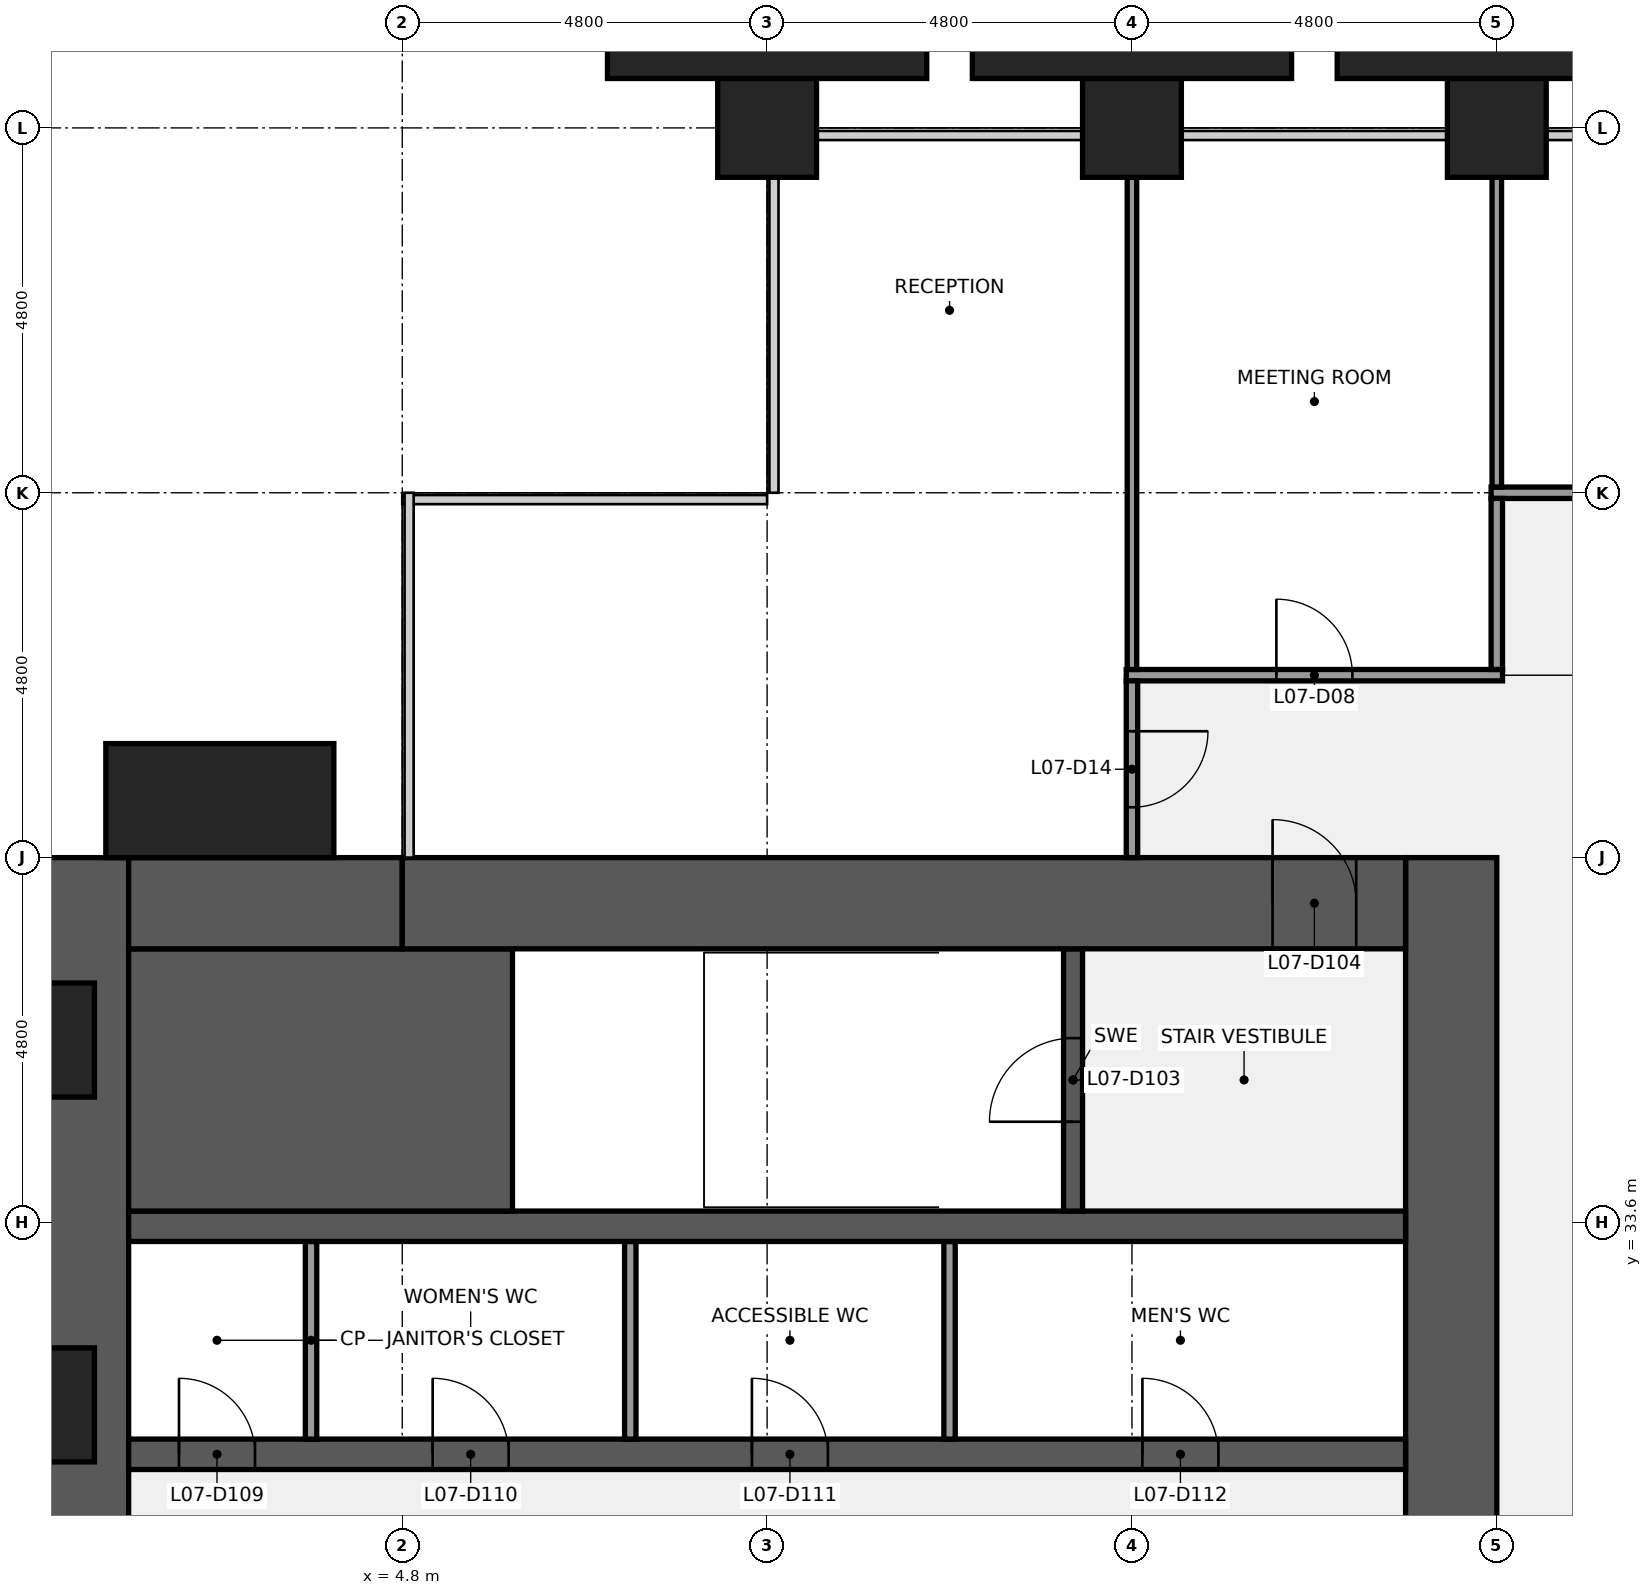
"""IFC4 building model, lengths in metres.
Left out: names, types, materials, properties, quantities, classifications, styles, units other than length and angle.
Written with IfcOpenShell. Run it as: python <this file> out.ifc"""

import sys

from ifc_helpers import new_model, si_unit, direction, frame, frame_2d, origin, origin_2d, place, context, subcontext, project, spatial, rectangle, extrude, element, fill, save


model = new_model("IFC4")
c1 = context("Model", 3, precision=1e-05, world=origin(), true_north=direction((0.0, 1.0)))
c2 = subcontext(c1, "Body", "Model", "MODEL_VIEW")
j1 = project(units=[si_unit("LENGTHUNIT", "METRE"), si_unit("PLANEANGLEUNIT", "RADIAN")], contexts=[c1])
p1 = place(None, origin())
s1 = spatial("IfcSite", under=j1, at=p1, CompositionType="ELEMENT")
p2 = place(p1, origin())
s2 = spatial("IfcBuilding", under=s1, at=p2, CompositionType="ELEMENT")
p3 = place(p2, frame((0.0, 0.0, 39.0)))
s3 = spatial("IfcBuildingStorey", under=s2, at=p3, CompositionType="ELEMENT", Elevation=39.0)
for number, where, z_axis, x_axis in (
    (1, (9.6, 48.0, 0.0), (0.0, 0.0, 1.0), (1.0, 0.0, 0.0)),
    (2, (14.4, 48.0, 0.0), (0.0, 0.0, 1.0), (1.0, 0.0, 0.0)),
    (3, (19.2, 48.0, 0.0), (0.0, 0.0, 1.0), (1.0, 0.0, 0.0)),
):
    element("IfcColumn", number, at=place(p3, frame(where, z_axis=z_axis, x_axis=x_axis)), inside=s3, PredefinedType="COLUMN", context=c2, shape_type="SweptSolid", body=[
        extrude(rectangle(XDim=1.3, YDim=1.3, at=origin_2d()), origin(), (0.0, 0.0, 1.0), 4.0),
    ])
p4 = place(p3, frame((0.6, 9.6, 0.0), z_axis=(0.0, 0.0, 1.0), x_axis=(0.0, 1.0, 0.0)))
e4 = element("IfcWall", 4, at=p4, inside=s3, PredefinedType="SHEAR", context=c2, shape_type="SweptSolid", body=[
    extrude(rectangle(XDim=28.8, YDim=1.2, at=frame_2d((14.4, 0.0))), origin(), (0.0, 0.0, 1.0), 3.84),
])
p5 = place(p4, frame((8.85, 0.0, 0.9)))
e5 = element("IfcOpeningElement", 5, at=p5, cuts=e4, PredefinedType="OPENING", context=c2, shape_type="SweptSolid", body=[
    extrude(rectangle(XDim=1.5, YDim=1.5, at=frame_2d((0.75, 0.75))), frame((0.0, 0.61, 0.0), z_axis=(0.0, -1.0, 0.0), x_axis=(1.0, 0.0, 0.0)), (0.0, 0.0, 1.0), 1.22),
])
p6 = place(p4, frame((18.45, 0.0, 0.9)))
e6 = element("IfcOpeningElement", 6, at=p6, cuts=e4, PredefinedType="OPENING", context=c2, shape_type="SweptSolid", body=[
    extrude(rectangle(XDim=1.5, YDim=1.5, at=frame_2d((0.75, 0.75))), frame((0.0, 0.61, 0.0), z_axis=(0.0, -1.0, 0.0), x_axis=(1.0, 0.0, 0.0)), (0.0, 0.0, 1.0), 1.22),
])
p7 = place(p3, frame((18.6, 38.4, 0.0), z_axis=(0.0, 0.0, 1.0), x_axis=(0.0, -1.0, 0.0)))
e7 = element("IfcWall", 7, at=p7, inside=s3, PredefinedType="SHEAR", context=c2, shape_type="SweptSolid", body=[
    extrude(rectangle(XDim=28.8, YDim=1.2, at=frame_2d((14.4, 0.0))), origin(), (0.0, 0.0, 1.0), 3.84),
])
p8 = place(p7, frame((18.3, 0.0, 0.0)))
e8 = element("IfcOpeningElement", 8, at=p8, cuts=e7, PredefinedType="OPENING", context=c2, shape_type="SweptSolid", body=[
    extrude(rectangle(XDim=1.8, YDim=2.1, at=frame_2d((0.9, 1.05))), frame((0.0, 0.61, 0.0), z_axis=(0.0, -1.0, 0.0), x_axis=(1.0, 0.0, 0.0)), (0.0, 0.0, 1.0), 1.22),
])
p9 = place(p7, frame((8.7, 0.0, 0.0)))
e9 = element("IfcOpeningElement", 9, at=p9, cuts=e7, PredefinedType="OPENING", context=c2, shape_type="SweptSolid", body=[
    extrude(rectangle(XDim=1.8, YDim=2.1, at=frame_2d((0.9, 1.05))), frame((0.0, 0.61, 0.0), z_axis=(0.0, -1.0, 0.0), x_axis=(1.0, 0.0, 0.0)), (0.0, 0.0, 1.0), 1.22),
])
p10 = place(p3, frame((1.2, 30.55, 0.0), z_axis=(0.0, 0.0, 1.0), x_axis=(1.0, 0.0, 0.0)))
e10 = element("IfcWall", 10, at=p10, inside=s3, PredefinedType="SHEAR", context=c2, shape_type="SweptSolid", body=[
    extrude(rectangle(XDim=16.8, YDim=0.4, at=frame_2d((8.4, 0.0))), origin(), (0.0, 0.0, 1.0), 3.84),
])
p11 = place(p10, frame((0.663, 0.0, 0.0)))
e11 = element("IfcOpeningElement", 11, at=p11, cuts=e10, PredefinedType="OPENING", context=c2, shape_type="SweptSolid", body=[
    extrude(rectangle(XDim=1.0, YDim=2.1, at=frame_2d((0.5, 1.05))), frame((0.0, 0.21, 0.0), z_axis=(0.0, -1.0, 0.0), x_axis=(1.0, 0.0, 0.0)), (0.0, 0.0, 1.0), 0.42),
])
p12 = place(p10, frame((4.0, 0.0, 0.0)))
e12 = element("IfcOpeningElement", 12, at=p12, cuts=e10, PredefinedType="OPENING", context=c2, shape_type="SweptSolid", body=[
    extrude(rectangle(XDim=1.0, YDim=2.1, at=frame_2d((0.5, 1.05))), frame((0.0, 0.21, 0.0), z_axis=(0.0, -1.0, 0.0), x_axis=(1.0, 0.0, 0.0)), (0.0, 0.0, 1.0), 0.42),
])
p13 = place(p10, frame((8.2, 0.0, 0.0)))
e13 = element("IfcOpeningElement", 13, at=p13, cuts=e10, PredefinedType="OPENING", context=c2, shape_type="SweptSolid", body=[
    extrude(rectangle(XDim=1.0, YDim=2.1, at=frame_2d((0.5, 1.05))), frame((0.0, 0.21, 0.0), z_axis=(0.0, -1.0, 0.0), x_axis=(1.0, 0.0, 0.0)), (0.0, 0.0, 1.0), 0.42),
])
p14 = place(p10, frame((13.337, 0.0, 0.0)))
e14 = element("IfcOpeningElement", 14, at=p14, cuts=e10, PredefinedType="OPENING", context=c2, shape_type="SweptSolid", body=[
    extrude(rectangle(XDim=1.0, YDim=2.1, at=frame_2d((0.5, 1.05))), frame((0.0, 0.21, 0.0), z_axis=(0.0, -1.0, 0.0), x_axis=(1.0, 0.0, 0.0)), (0.0, 0.0, 1.0), 0.42),
])
for number, where, z_axis, x_axis in (
    (15, (3.6, 30.75, 0.0), (0.0, 0.0, 1.0), (0.0, 1.0, 0.0)),
    (16, (7.8, 30.75, 0.0), (0.0, 0.0, 1.0), (0.0, 1.0, 0.0)),
    (17, (12.0, 30.75, 0.0), (0.0, 0.0, 1.0), (0.0, 1.0, 0.0)),
):
    element("IfcWall", number, at=place(p3, frame(where, z_axis=z_axis, x_axis=x_axis)), inside=s3, PredefinedType="PARTITIONING", context=c2, shape_type="SweptSolid", body=[
        extrude(rectangle(XDim=2.6, YDim=0.15, at=frame_2d((1.3, 0.0))), origin(), (0.0, 0.0, 1.0), 3.84),
    ])
p15 = place(p3, frame((1.2, 33.55, 0.0), z_axis=(0.0, 0.0, 1.0), x_axis=(1.0, 0.0, 0.0)))
e18 = element("IfcWall", 18, at=p15, inside=s3, PredefinedType="SHEAR", context=c2, shape_type="SweptSolid", body=[
    extrude(rectangle(XDim=16.8, YDim=0.4, at=frame_2d((8.4, 0.0))), origin(), (0.0, 0.0, 1.0), 3.84),
])
p16 = place(p3, frame((1.2, 35.475, 0.0), z_axis=(0.0, 0.0, 1.0), x_axis=(1.0, 0.0, 0.0)))
e19 = element("IfcWall", 19, at=p16, inside=s3, PredefinedType="SHEAR", context=c2, shape_type="SweptSolid", body=[
    extrude(rectangle(XDim=5.05, YDim=3.45, at=frame_2d((2.525, 0.0))), origin(), (0.0, 0.0, 1.0), 3.84),
])
p17 = place(p3, frame((13.625, 33.75, 0.0), z_axis=(0.0, 0.0, 1.0), x_axis=(0.0, 1.0, 0.0)))
e20 = element("IfcWall", 20, at=p17, inside=s3, PredefinedType="SHEAR", context=c2, shape_type="SweptSolid", body=[
    extrude(rectangle(XDim=3.45, YDim=0.25, at=frame_2d((1.725, 0.0))), origin(), (0.0, 0.0, 1.0), 3.84),
])
p18 = place(p17, frame((1.175, 0.0, 0.0)))
e21 = element("IfcOpeningElement", 21, at=p18, cuts=e20, PredefinedType="OPENING", context=c2, shape_type="SweptSolid", body=[
    extrude(rectangle(XDim=1.1, YDim=2.1, at=frame_2d((0.55, 1.05))), frame((0.0, 0.135, 0.0), z_axis=(0.0, -1.0, 0.0), x_axis=(1.0, 0.0, 0.0)), (0.0, 0.0, 1.0), 0.27),
])
p19 = place(p3, frame((1.2, 37.8, 0.0), z_axis=(0.0, 0.0, 1.0), x_axis=(1.0, 0.0, 0.0)))
e22 = element("IfcWall", 22, at=p19, inside=s3, PredefinedType="SHEAR", context=c2, shape_type="SweptSolid", body=[
    extrude(rectangle(XDim=3.6, YDim=1.2, at=frame_2d((1.8, 0.0))), origin(), (0.0, 0.0, 1.0), 3.84),
])
p20 = place(p3, frame((4.8, 37.8, 0.0), z_axis=(0.0, 0.0, 1.0), x_axis=(1.0, 0.0, 0.0)))
e23 = element("IfcWall", 23, at=p20, inside=s3, PredefinedType="SHEAR", context=c2, shape_type="SweptSolid", body=[
    extrude(rectangle(XDim=13.2, YDim=1.2, at=frame_2d((6.6, 0.0))), origin(), (0.0, 0.0, 1.0), 3.84),
])
p21 = place(p20, frame((11.45, 0.0, 0.0)))
e24 = element("IfcOpeningElement", 24, at=p21, cuts=e23, PredefinedType="OPENING", context=c2, shape_type="SweptSolid", body=[
    extrude(rectangle(XDim=1.1, YDim=2.1, at=frame_2d((0.55, 1.05))), frame((0.0, 0.61, 0.0), z_axis=(0.0, -1.0, 0.0), x_axis=(1.0, 0.0, 0.0)), (0.0, 0.0, 1.0), 1.22),
])
p22 = place(p3, frame((14.325, 40.8, 0.0), z_axis=(0.0, 0.0, 1.0), x_axis=(1.0, 0.0, 0.0)))
e25 = element("IfcWall", 25, at=p22, inside=s3, PredefinedType="PARTITIONING", context=c2, shape_type="SweptSolid", body=[
    extrude(rectangle(XDim=4.95, YDim=0.15, at=frame_2d((2.475, 0.0))), origin(), (0.0, 0.0, 1.0), 2.87),
])
p23 = place(p22, frame((1.975, 0.0, 0.0)))
e26 = element("IfcOpeningElement", 26, at=p23, cuts=e25, PredefinedType="OPENING", context=c2, shape_type="SweptSolid", body=[
    extrude(rectangle(XDim=1.0, YDim=2.1, at=frame_2d((0.5, 1.05))), frame((0.0, 0.085, 0.0), z_axis=(0.0, -1.0, 0.0), x_axis=(1.0, 0.0, 0.0)), (0.0, 0.0, 1.0), 0.17),
])
p24 = place(p3, frame((19.125, 43.2, 0.0), z_axis=(0.0, 0.0, 1.0), x_axis=(1.0, 0.0, 0.0)))
e27 = element("IfcWall", 27, at=p24, inside=s3, PredefinedType="PARTITIONING", context=c2, shape_type="SweptSolid", body=[
    extrude(rectangle(XDim=19.35, YDim=0.15, at=frame_2d((9.675, 0.0))), origin(), (0.0, 0.0, 1.0), 2.87),
])
p25 = place(p24, frame((9.175, 0.0, 0.0)))
e28 = element("IfcOpeningElement", 28, at=p25, cuts=e27, PredefinedType="OPENING", context=c2, shape_type="SweptSolid", body=[
    extrude(rectangle(XDim=1.0, YDim=2.1, at=frame_2d((0.5, 1.05))), frame((0.0, 0.085, 0.0), z_axis=(0.0, -1.0, 0.0), x_axis=(1.0, 0.0, 0.0)), (0.0, 0.0, 1.0), 0.17),
])
p26 = place(p3, frame((14.4, 40.875, 0.0), z_axis=(0.0, 0.0, 1.0), x_axis=(0.0, 1.0, 0.0)))
e29 = element("IfcWall", 29, at=p26, inside=s3, PredefinedType="PARTITIONING", context=c2, shape_type="SweptSolid", body=[
    extrude(rectangle(XDim=6.475, YDim=0.125, at=frame_2d((3.238, 0.0))), origin(), (0.0, 0.0, 1.0), 2.87),
])
p27 = place(p3, frame((14.4, 38.4, 0.0), z_axis=(0.0, 0.0, 1.0), x_axis=(0.0, 1.0, 0.0)))
e30 = element("IfcWall", 30, at=p27, inside=s3, PredefinedType="PARTITIONING", context=c2, shape_type="SweptSolid", body=[
    extrude(rectangle(XDim=2.325, YDim=0.15, at=frame_2d((1.163, 0.0))), origin(), (0.0, 0.0, 1.0), 2.87),
])
p28 = place(p27, frame((0.663, 0.0, 0.0)))
e31 = element("IfcOpeningElement", 31, at=p28, cuts=e30, PredefinedType="OPENING", context=c2, shape_type="SweptSolid", body=[
    extrude(rectangle(XDim=1.0, YDim=2.1, at=frame_2d((0.5, 1.05))), frame((0.0, 0.085, 0.0), z_axis=(0.0, -1.0, 0.0), x_axis=(1.0, 0.0, 0.0)), (0.0, 0.0, 1.0), 0.17),
])
p29 = place(p3, frame((19.2, 43.275, 0.0), z_axis=(0.0, 0.0, 1.0), x_axis=(0.0, 1.0, 0.0)))
e32 = element("IfcWall", 32, at=p29, inside=s3, PredefinedType="PARTITIONING", context=c2, shape_type="SweptSolid", body=[
    extrude(rectangle(XDim=4.075, YDim=0.125, at=frame_2d((2.038, 0.0))), origin(), (0.0, 0.0, 1.0), 2.87),
])
p30 = place(p3, frame((19.2, 40.875, 0.0), z_axis=(0.0, 0.0, 1.0), x_axis=(0.0, 1.0, 0.0)))
e33 = element("IfcWall", 33, at=p30, inside=s3, PredefinedType="PARTITIONING", context=c2, shape_type="SweptSolid", body=[
    extrude(rectangle(XDim=2.25, YDim=0.15, at=frame_2d((1.125, 0.0))), origin(), (0.0, 0.0, 1.0), 2.87),
])
p31 = place(p3, frame((2.4, 39.15, 0.0), z_axis=(0.0, 0.0, 1.0), x_axis=(1.0, 0.0, 0.0)))
e34 = element("IfcColumn", 34, at=p31, inside=s3, PredefinedType="PILASTER", context=c2, shape_type="SweptSolid", body=[
    extrude(rectangle(XDim=3.0, YDim=1.5, at=origin_2d()), origin(), (0.0, 0.0, 1.0), 4.0),
])
for number, where, z_axis, x_axis in (
    (35, (9.6, 49.075, 0.0), (0.0, 0.0, 1.0), (1.0, 0.0, 0.0)),
    (36, (14.4, 49.075, 0.0), (0.0, 0.0, 1.0), (1.0, 0.0, 0.0)),
    (37, (19.2, 49.075, 0.0), (0.0, 0.0, 1.0), (1.0, 0.0, 0.0)),
):
    element("IfcColumn", number, at=place(p3, frame(where, z_axis=z_axis, x_axis=x_axis)), inside=s3, PredefinedType="PILASTER", context=c2, shape_type="SweptSolid", body=[
        extrude(rectangle(XDim=4.2, YDim=0.85, at=origin_2d()), origin(), (0.0, 0.0, 1.0), 4.0),
    ])
p32 = place(p18, origin())
e38 = element("IfcDoor", 38, at=p32, inside=s3, OperationType="SINGLE_SWING_LEFT", PredefinedType="DOOR", context=c2, shape_type="SweptSolid", body=[
    extrude(rectangle(XDim=1.1, YDim=2.1, at=frame_2d((0.55, 1.05))), frame((0.0, 0.025, 0.0), z_axis=(0.0, -1.0, 0.0), x_axis=(1.0, 0.0, 0.0)), (0.0, 0.0, 1.0), 0.05),
])
fill(e21, e38)
p33 = place(p21, origin())
e39 = element("IfcDoor", 39, at=p33, inside=s3, OperationType="SINGLE_SWING_LEFT", PredefinedType="DOOR", context=c2, shape_type="SweptSolid", body=[
    extrude(rectangle(XDim=1.1, YDim=2.1, at=frame_2d((0.55, 1.05))), frame((0.0, 0.025, 0.0), z_axis=(0.0, -1.0, 0.0), x_axis=(1.0, 0.0, 0.0)), (0.0, 0.0, 1.0), 0.05),
])
fill(e24, e39)
p34 = place(p11, origin())
e40 = element("IfcDoor", 40, at=p34, inside=s3, OperationType="SINGLE_SWING_LEFT", PredefinedType="DOOR", context=c2, shape_type="SweptSolid", body=[
    extrude(rectangle(XDim=1.0, YDim=2.1, at=frame_2d((0.5, 1.05))), frame((0.0, 0.025, 0.0), z_axis=(0.0, -1.0, 0.0), x_axis=(1.0, 0.0, 0.0)), (0.0, 0.0, 1.0), 0.05),
])
fill(e11, e40)
p35 = place(p12, origin())
e41 = element("IfcDoor", 41, at=p35, inside=s3, OperationType="SINGLE_SWING_LEFT", PredefinedType="DOOR", context=c2, shape_type="SweptSolid", body=[
    extrude(rectangle(XDim=1.0, YDim=2.1, at=frame_2d((0.5, 1.05))), frame((0.0, 0.025, 0.0), z_axis=(0.0, -1.0, 0.0), x_axis=(1.0, 0.0, 0.0)), (0.0, 0.0, 1.0), 0.05),
])
fill(e12, e41)
p36 = place(p13, origin())
e42 = element("IfcDoor", 42, at=p36, inside=s3, OperationType="SINGLE_SWING_LEFT", PredefinedType="DOOR", context=c2, shape_type="SweptSolid", body=[
    extrude(rectangle(XDim=1.0, YDim=2.1, at=frame_2d((0.5, 1.05))), frame((0.0, 0.025, 0.0), z_axis=(0.0, -1.0, 0.0), x_axis=(1.0, 0.0, 0.0)), (0.0, 0.0, 1.0), 0.05),
])
fill(e13, e42)
p37 = place(p14, origin())
e43 = element("IfcDoor", 43, at=p37, inside=s3, OperationType="SINGLE_SWING_LEFT", PredefinedType="DOOR", context=c2, shape_type="SweptSolid", body=[
    extrude(rectangle(XDim=1.0, YDim=2.1, at=frame_2d((0.5, 1.05))), frame((0.0, 0.025, 0.0), z_axis=(0.0, -1.0, 0.0), x_axis=(1.0, 0.0, 0.0)), (0.0, 0.0, 1.0), 0.05),
])
fill(e14, e43)
p38 = place(p23, origin())
e44 = element("IfcDoor", 44, at=p38, inside=s3, OperationType="SINGLE_SWING_LEFT", PredefinedType="DOOR", context=c2, shape_type="SweptSolid", body=[
    extrude(rectangle(XDim=1.0, YDim=2.1, at=frame_2d((0.5, 1.05))), frame((0.0, 0.025, 0.0), z_axis=(0.0, -1.0, 0.0), x_axis=(1.0, 0.0, 0.0)), (0.0, 0.0, 1.0), 0.05),
])
fill(e26, e44)
p39 = place(p28, origin())
e45 = element("IfcDoor", 45, at=p39, inside=s3, OperationType="SINGLE_SWING_RIGHT", PredefinedType="DOOR", context=c2, shape_type="SweptSolid", body=[
    extrude(rectangle(XDim=1.0, YDim=2.1, at=frame_2d((0.5, 1.05))), frame((0.0, 0.025, 0.0), z_axis=(0.0, -1.0, 0.0), x_axis=(1.0, 0.0, 0.0)), (0.0, 0.0, 1.0), 0.05),
])
fill(e31, e45)
save(model, sys.argv[1])
